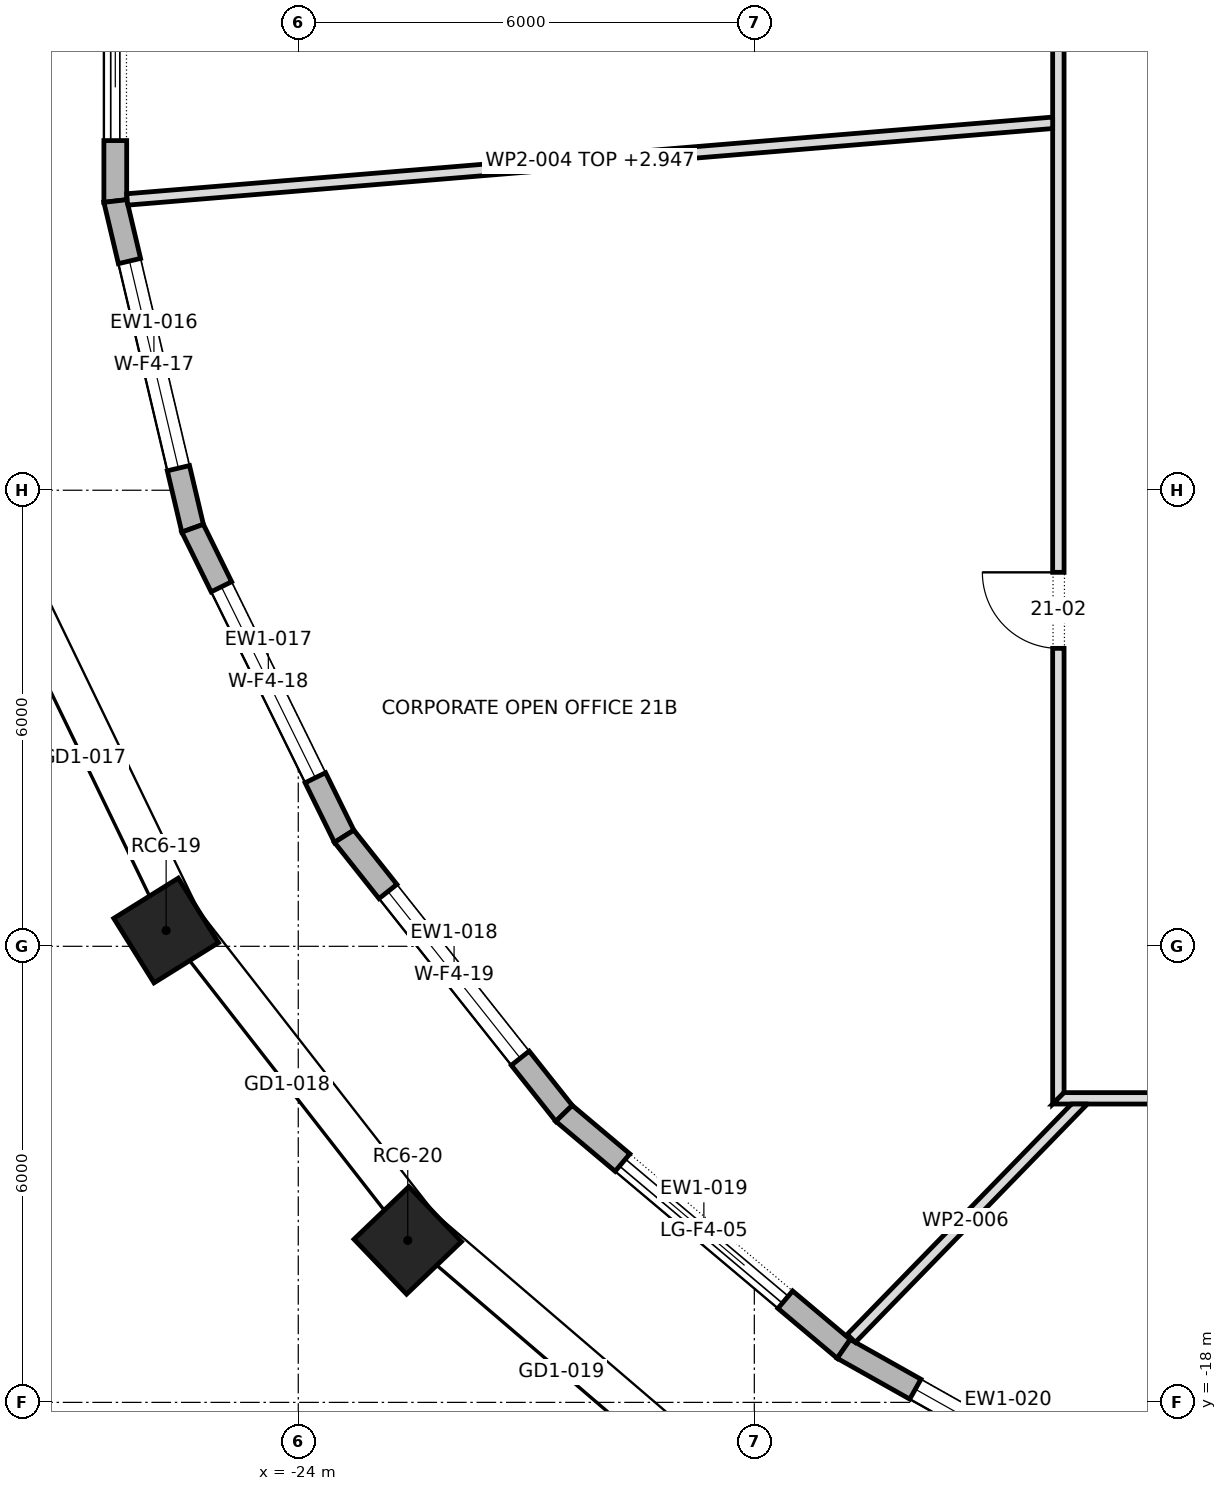
"""IFC4 building model, lengths in metres.
Left out: names, types, materials, properties, quantities, classifications, styles, units other than length and angle.
Written with IfcOpenShell. Run it as: python <this file> out.ifc"""

import sys

from ifc_helpers import new_model, si_unit, direction, frame, frame_2d, origin, origin_2d, place, context, subcontext, project, spatial, polyline, rectangle, outline, extrude, element, fill, save


model = new_model("IFC4")
c1 = context("Model", 3, precision=1e-05, world=origin(), true_north=direction((0.0, 1.0)))
c2 = subcontext(c1, "Body", "Model", "MODEL_VIEW")
j1 = project(units=[si_unit("LENGTHUNIT", "METRE"), si_unit("PLANEANGLEUNIT", "RADIAN")], contexts=[c1])
p1 = place(None, origin())
s1 = spatial("IfcSite", under=j1, at=p1, CompositionType="ELEMENT")
p2 = place(p1, origin())
s2 = spatial("IfcBuilding", under=s1, at=p2, CompositionType="ELEMENT")
p3 = place(p2, frame((0.0, 0.0, 292.3)))
s3 = spatial("IfcBuildingStorey", under=s2, at=p3, CompositionType="ELEMENT", Elevation=292.3)
for number, where, z_axis, x_axis in (
    (1, (-25.738, -11.792, 0.0), (0.0, 0.0, 1.0), (0.529, -0.849, 0.0)),
    (2, (-22.56, -15.869, 0.0), (0.0, 0.0, 1.0), (0.692, -0.722, 0.0)),
):
    element("IfcColumn", number, at=place(p3, frame(where, z_axis=z_axis, x_axis=x_axis)), inside=s3, PredefinedType="COLUMN", context=c2, shape_type="SweptSolid", body=[
        extrude(rectangle(XDim=1.0, YDim=1.0, at=origin_2d()), origin(), (0.0, 0.0, 1.0), 4.0),
    ])
p4 = place(p3, frame((-26.407, 2.195, 0.0), z_axis=(0.0, 0.0, 1.0), x_axis=(0.0, -1.0, 0.0)))
e3 = element("IfcWall", 3, at=p4, inside=s3, PredefinedType="STANDARD", context=c2, shape_type="SweptSolid", body=[
    extrude(outline(polyline([(-0.018, -0.15), (4.408, -0.15), (4.373, 0.15), (0.018, 0.15), (-0.018, -0.15)])), origin(), (0.0, 0.0, 1.0), 3.7),
])
p5 = place(p4, frame((0.795, 0.0, 0.0)))
e4 = element("IfcOpeningElement", 4, at=p5, cuts=e3, PredefinedType="OPENING", context=c2, shape_type="SweptSolid", body=[
    extrude(rectangle(XDim=2.8, YDim=3.25, at=frame_2d((1.4, 1.625))), frame((0.0, 0.162, 0.0), z_axis=(0.0, -1.0, 0.0), x_axis=(1.0, 0.0, 0.0)), (0.0, 0.0, 1.0), 0.324),
])
p6 = place(p3, frame((-26.407, -2.195, 0.0), z_axis=(0.0, 0.0, 1.0), x_axis=(0.229943714271, -0.973203929435, 0.0)))
e5 = element("IfcWall", 5, at=p6, inside=s3, PredefinedType="STANDARD", context=c2, shape_type="SweptSolid", body=[
    extrude(outline(polyline([(-0.018, -0.15), (4.44, -0.15), (4.406, 0.15), (0.018, 0.15), (-0.018, -0.15)])), origin(), (0.0, 0.0, 1.0), 3.7),
])
p7 = place(p6, frame((0.812, 0.0, 0.6)))
e6 = element("IfcOpeningElement", 6, at=p7, cuts=e5, PredefinedType="OPENING", context=c2, shape_type="SweptSolid", body=[
    extrude(rectangle(XDim=2.8, YDim=2.65, at=frame_2d((1.4, 1.325))), frame((0.0, 0.162, 0.0), z_axis=(0.0, -1.0, 0.0), x_axis=(1.0, 0.0, 0.0)), (0.0, 0.0, 1.0), 0.324),
])
p8 = place(p3, frame((-25.39, -6.5, 0.0), z_axis=(0.0, 0.0, 1.0), x_axis=(0.441431671743, -0.897294867467, 0.0)))
e7 = element("IfcWall", 7, at=p8, inside=s3, PredefinedType="STANDARD", context=c2, shape_type="SweptSolid", body=[
    extrude(outline(polyline([(-0.017, -0.15), (4.533, -0.15), (4.501, 0.15), (0.017, 0.15), (-0.017, -0.15)])), origin(), (0.0, 0.0, 1.0), 3.7),
])
p9 = place(p8, frame((0.858, 0.0, 0.6)))
e8 = element("IfcOpeningElement", 8, at=p9, cuts=e7, PredefinedType="OPENING", context=c2, shape_type="SweptSolid", body=[
    extrude(rectangle(XDim=2.8, YDim=2.65, at=frame_2d((1.4, 1.325))), frame((0.0, 0.162, 0.0), z_axis=(0.0, -1.0, 0.0), x_axis=(1.0, 0.0, 0.0)), (0.0, 0.0, 1.0), 0.324),
])
p10 = place(p3, frame((-23.396, -10.553, 0.0), z_axis=(0.0, 0.0, 1.0), x_axis=(0.621625671247, -0.783314448256, 0.0)))
e9 = element("IfcWall", 9, at=p10, inside=s3, PredefinedType="STANDARD", context=c2, shape_type="SweptSolid", body=[
    extrude(outline(polyline([(-0.016, -0.15), (4.669, -0.15), (4.638, 0.15), (0.016, 0.15), (-0.016, -0.15)])), origin(), (0.0, 0.0, 1.0), 3.7),
])
p11 = place(p10, frame((0.927, 0.0, 0.6)))
e10 = element("IfcOpeningElement", 10, at=p11, cuts=e9, PredefinedType="OPENING", context=c2, shape_type="SweptSolid", body=[
    extrude(rectangle(XDim=2.8, YDim=2.65, at=frame_2d((1.4, 1.325))), frame((0.0, 0.162, 0.0), z_axis=(0.0, -1.0, 0.0), x_axis=(1.0, 0.0, 0.0)), (0.0, 0.0, 1.0), 0.324),
])
p12 = place(p3, frame((-20.503, -14.198, 0.0), z_axis=(0.0, 0.0, 1.0), x_axis=(0.764966473721, -0.644070100286, 0.0)))
e11 = element("IfcWall", 11, at=p12, inside=s3, PredefinedType="STANDARD", context=c2, shape_type="SweptSolid", body=[
    extrude(outline(polyline([(-0.015, -0.15), (4.824, -0.15), (4.796, 0.15), (0.015, 0.15), (-0.015, -0.15)])), origin(), (0.0, 0.0, 1.0), 3.7),
])
p13 = place(p12, frame((1.005, 0.0, 0.0)))
e12 = element("IfcOpeningElement", 12, at=p13, cuts=e11, PredefinedType="OPENING", context=c2, shape_type="SweptSolid", body=[
    extrude(rectangle(XDim=2.8, YDim=3.25, at=frame_2d((1.4, 1.625))), frame((0.0, 0.162, 0.0), z_axis=(0.0, -1.0, 0.0), x_axis=(1.0, 0.0, 0.0)), (0.0, 0.0, 1.0), 0.324),
])
p14 = place(p3, frame((-16.824, -17.296, 0.0), z_axis=(0.0, 0.0, 1.0), x_axis=(0.871512454536, -0.490373369575, 0.0)))
e13 = element("IfcWall", 13, at=p14, inside=s3, PredefinedType="STANDARD", context=c2, shape_type="SweptSolid", body=[
    extrude(outline(polyline([(-0.014, -0.15), (4.975, -0.15), (4.948, 0.15), (0.014, 0.15), (-0.014, -0.15)])), origin(), (0.0, 0.0, 1.0), 3.7),
])
p15 = place(p14, frame((1.081, 0.0, 0.6)))
e14 = element("IfcOpeningElement", 14, at=p15, cuts=e13, PredefinedType="OPENING", context=c2, shape_type="SweptSolid", body=[
    extrude(rectangle(XDim=2.8, YDim=2.65, at=frame_2d((1.4, 1.325))), frame((0.0, 0.162, 0.0), z_axis=(0.0, -1.0, 0.0), x_axis=(1.0, 0.0, 0.0)), (0.0, 0.0, 1.0), 0.324),
])
p16 = place(p3, frame((-14.0, -14.075, 0.0), z_axis=(0.0, 0.0, 1.0), x_axis=(0.0, 1.0, 0.0)))
e15 = element("IfcWall", 15, at=p16, inside=s3, PredefinedType="PARTITIONING", context=c2, shape_type="SweptSolid", body=[
    extrude(outline(polyline([(0.15, -0.075), (2.139, -0.075), (4.128, -0.075), (6.118, -0.075), (8.107, -0.075), (10.096, -0.075), (12.086, -0.075), (14.075, -0.075), (16.064, -0.075), (18.053, -0.075), (20.043, -0.075), (22.032, -0.075), (24.021, -0.075), (26.011, -0.075), (28.0, -0.075), (28.15, 0.075), (26.273, 0.075), (24.396, 0.075), (22.52, 0.075), (20.643, 0.075), (18.767, 0.075), (16.89, 0.075), (15.013, 0.075), (13.137, 0.075), (11.26, 0.075), (9.383, 0.075), (7.507, 0.075), (5.63, 0.075), (3.753, 0.075), (1.877, 0.075), (0.0, 0.075), (0.15, -0.075)])), origin(), (0.0, 0.0, 1.0), 3.7),
])
p17 = place(p16, frame((17.43, 0.0, 0.0)))
e16 = element("IfcOpeningElement", 16, at=p17, cuts=e15, PredefinedType="OPENING", context=c2, shape_type="SweptSolid", body=[
    extrude(rectangle(XDim=1.8, YDim=2.1, at=frame_2d((0.9, 1.05))), frame((0.0, 0.087, 0.0), z_axis=(0.0, -1.0, 0.0), x_axis=(1.0, 0.0, 0.0)), (0.0, 0.0, 1.0), 0.174),
])
p18 = place(p16, frame((5.995, 0.0, 0.0)))
e17 = element("IfcOpeningElement", 17, at=p18, cuts=e15, PredefinedType="OPENING", context=c2, shape_type="SweptSolid", body=[
    extrude(rectangle(XDim=1.0, YDim=2.1, at=frame_2d((0.5, 1.05))), frame((0.0, 0.087, 0.0), z_axis=(0.0, -1.0, 0.0), x_axis=(1.0, 0.0, 0.0)), (0.0, 0.0, 1.0), 0.174),
])
p19 = place(p3, frame((-14.075, -14.0, 0.0), z_axis=(0.0, 0.0, 1.0), x_axis=(1.0, 0.0, 0.0)))
e18 = element("IfcWall", 18, at=p19, inside=s3, PredefinedType="PARTITIONING", context=c2, shape_type="SweptSolid", body=[
    extrude(outline(polyline([(0.0, -0.075), (1.877, -0.075), (3.753, -0.075), (5.63, -0.075), (7.507, -0.075), (9.383, -0.075), (11.26, -0.075), (13.137, -0.075), (15.013, -0.075), (16.89, -0.075), (18.767, -0.075), (20.643, -0.075), (22.52, -0.075), (24.396, -0.075), (26.273, -0.075), (28.15, -0.075), (28.0, 0.075), (26.011, 0.075), (24.021, 0.075), (22.032, 0.075), (20.043, 0.075), (18.053, 0.075), (16.064, 0.075), (14.075, 0.075), (12.086, 0.075), (10.096, 0.075), (8.107, 0.075), (6.118, 0.075), (4.128, 0.075), (2.139, 0.075), (0.15, 0.075), (0.0, -0.075)])), origin(), (0.0, 0.0, 1.0), 3.7),
])
p20 = place(p19, frame((5.93, 0.0, 0.0)))
e19 = element("IfcOpeningElement", 19, at=p20, cuts=e18, PredefinedType="OPENING", context=c2, shape_type="SweptSolid", body=[
    extrude(rectangle(XDim=1.0, YDim=2.1, at=frame_2d((0.5, 1.05))), frame((0.0, 0.087, 0.0), z_axis=(0.0, -1.0, 0.0), x_axis=(1.0, 0.0, 0.0)), (0.0, 0.0, 1.0), 0.174),
])
p21 = place(p19, frame((17.2, 0.0, 0.0)))
e20 = element("IfcOpeningElement", 20, at=p21, cuts=e18, PredefinedType="OPENING", context=c2, shape_type="SweptSolid", body=[
    extrude(rectangle(XDim=1.0, YDim=2.1, at=frame_2d((0.5, 1.05))), frame((0.0, 0.087, 0.0), z_axis=(0.0, -1.0, 0.0), x_axis=(1.0, 0.0, 0.0)), (0.0, 0.0, 1.0), 0.174),
])
p22 = place(p3, frame((-14.069, -1.166, 0.0), z_axis=(0.0, 0.0, 1.0), x_axis=(-0.99659010846, -0.082511549014, 0.0)))
e21 = element("IfcWall", 21, at=p22, inside=s3, PredefinedType="PARTITIONING", context=c2, shape_type="SweptSolid", body=[
    extrude(outline(polyline([(12.223, -0.075), (12.223, 0.047), (12.219, 0.075), (10.475, 0.075), (8.731, 0.075), (6.987, 0.075), (5.243, 0.075), (3.5, 0.075), (1.756, 0.075), (0.012, 0.075), (0.0, -0.069), (0.0, -0.075), (1.746, -0.075), (3.492, -0.075), (5.239, -0.075), (6.985, -0.075), (8.731, -0.075), (10.477, -0.075), (12.223, -0.075)])), origin(), (0.0, 0.0, 1.0), 2.947),
])
p23 = place(p3, frame((-13.672, -14.023, 0.0), z_axis=(0.0, 0.0, 1.0), x_axis=(-0.697528481307, -0.716557058277, 0.0)))
e22 = element("IfcWall", 22, at=p23, inside=s3, PredefinedType="PARTITIONING", context=c2, shape_type="SweptSolid", body=[
    extrude(outline(polyline([(0.0, 0.075), (0.0, 0.075), (0.146, -0.075), (1.555, -0.075), (2.965, -0.075), (4.375, -0.075), (4.375, 0.075), (2.917, 0.075), (1.458, 0.075), (0.0, 0.075)])), origin(), (0.0, 0.0, 1.0), 3.7),
])
p24 = place(p5, origin())
e23 = element("IfcDoor", 23, at=p24, inside=s3, OperationType="DOUBLE_DOOR_SLIDING", PredefinedType="DOOR", context=c2, shape_type="SweptSolid", body=[
    extrude(rectangle(XDim=2.8, YDim=3.25, at=frame_2d((1.4, 1.625))), frame((0.0, 0.025, 0.0), z_axis=(0.0, -1.0, 0.0), x_axis=(1.0, 0.0, 0.0)), (0.0, 0.0, 1.0), 0.05),
])
fill(e4, e23)
p25 = place(p7, origin())
e24 = element("IfcWindow", 24, at=p25, inside=s3, PartitioningType="DOUBLE_PANEL_VERTICAL", PredefinedType="WINDOW", context=c2, shape_type="SweptSolid", body=[
    extrude(rectangle(XDim=2.8, YDim=2.65, at=frame_2d((1.4, 1.325))), frame((0.0, 0.03, 0.0), z_axis=(0.0, -1.0, 0.0), x_axis=(1.0, 0.0, 0.0)), (0.0, 0.0, 1.0), 0.06),
])
fill(e6, e24)
p26 = place(p9, origin())
e25 = element("IfcWindow", 25, at=p26, inside=s3, PartitioningType="DOUBLE_PANEL_VERTICAL", PredefinedType="WINDOW", context=c2, shape_type="SweptSolid", body=[
    extrude(rectangle(XDim=2.8, YDim=2.65, at=frame_2d((1.4, 1.325))), frame((0.0, 0.03, 0.0), z_axis=(0.0, -1.0, 0.0), x_axis=(1.0, 0.0, 0.0)), (0.0, 0.0, 1.0), 0.06),
])
fill(e8, e25)
p27 = place(p11, origin())
e26 = element("IfcWindow", 26, at=p27, inside=s3, PartitioningType="DOUBLE_PANEL_VERTICAL", PredefinedType="WINDOW", context=c2, shape_type="SweptSolid", body=[
    extrude(rectangle(XDim=2.8, YDim=2.65, at=frame_2d((1.4, 1.325))), frame((0.0, 0.03, 0.0), z_axis=(0.0, -1.0, 0.0), x_axis=(1.0, 0.0, 0.0)), (0.0, 0.0, 1.0), 0.06),
])
fill(e10, e26)
p28 = place(p13, origin())
e27 = element("IfcDoor", 27, at=p28, inside=s3, OperationType="DOUBLE_DOOR_SLIDING", PredefinedType="DOOR", context=c2, shape_type="SweptSolid", body=[
    extrude(rectangle(XDim=2.8, YDim=3.25, at=frame_2d((1.4, 1.625))), frame((0.0, 0.025, 0.0), z_axis=(0.0, -1.0, 0.0), x_axis=(1.0, 0.0, 0.0)), (0.0, 0.0, 1.0), 0.05),
])
fill(e12, e27)
p29 = place(p15, origin())
e28 = element("IfcWindow", 28, at=p29, inside=s3, PartitioningType="DOUBLE_PANEL_VERTICAL", PredefinedType="WINDOW", context=c2, shape_type="SweptSolid", body=[
    extrude(rectangle(XDim=2.8, YDim=2.65, at=frame_2d((1.4, 1.325))), frame((0.0, 0.03, 0.0), z_axis=(0.0, -1.0, 0.0), x_axis=(1.0, 0.0, 0.0)), (0.0, 0.0, 1.0), 0.06),
])
fill(e14, e28)
p30 = place(p18, origin())
e29 = element("IfcDoor", 29, at=p30, inside=s3, OperationType="SINGLE_SWING_LEFT", PredefinedType="DOOR", context=c2, shape_type="SweptSolid", body=[
    extrude(rectangle(XDim=1.0, YDim=2.1, at=frame_2d((0.5, 1.05))), frame((0.0, 0.025, 0.0), z_axis=(0.0, -1.0, 0.0), x_axis=(1.0, 0.0, 0.0)), (0.0, 0.0, 1.0), 0.05),
])
fill(e17, e29)
save(model, sys.argv[1])
